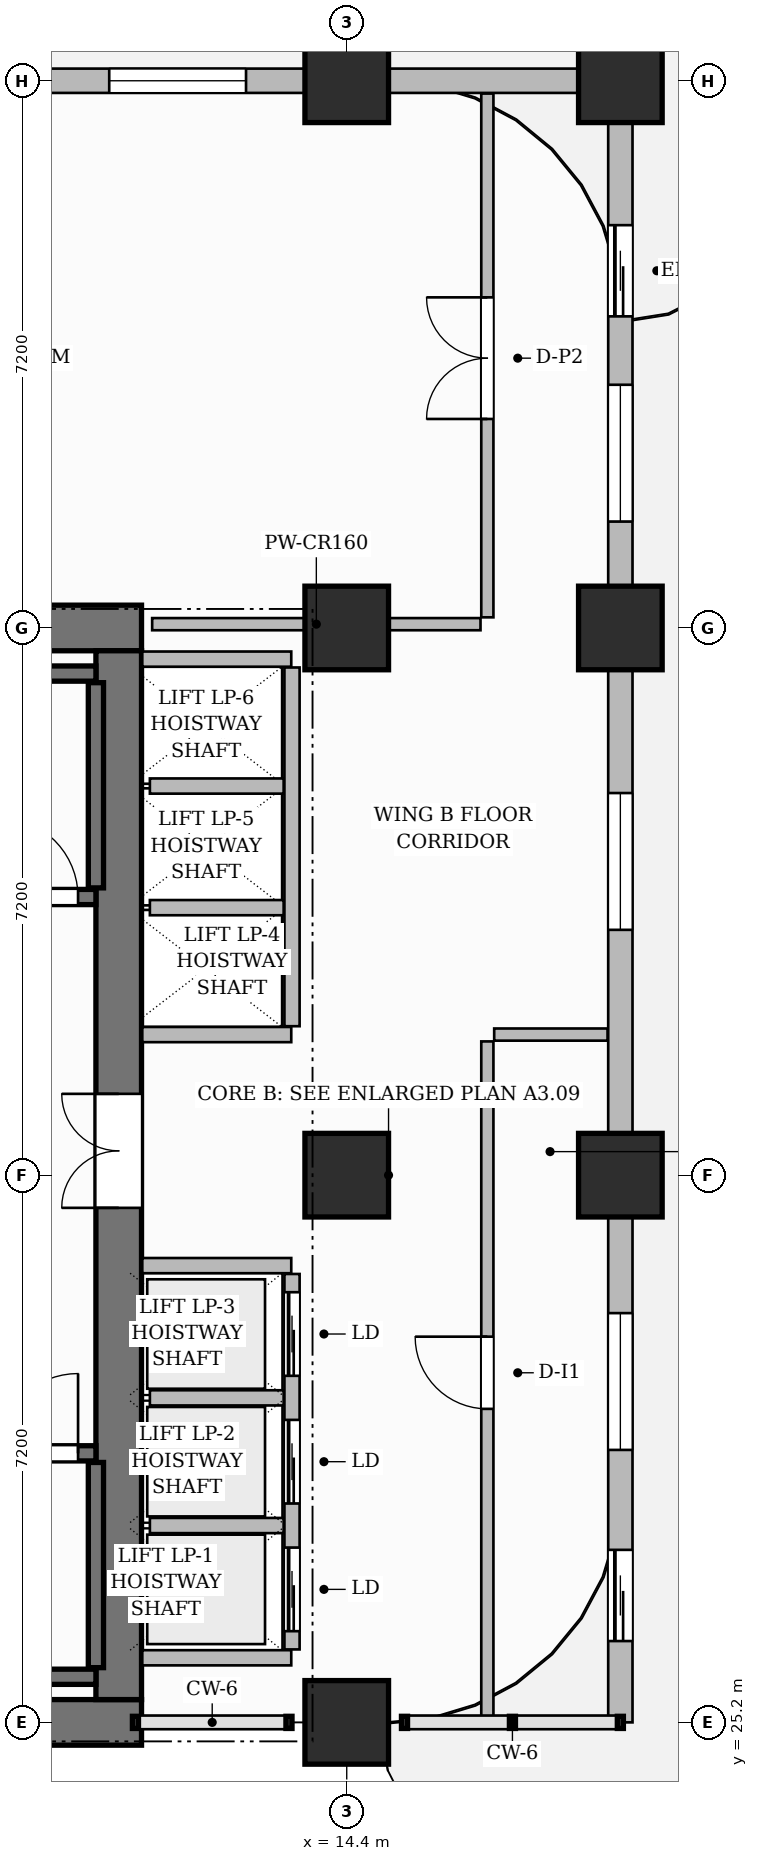
"""IFC4 building model, lengths in metres.
Left out: names, types, materials, properties, quantities, classifications, styles, units other than length and angle.
Written with IfcOpenShell. Run it as: python <this file> out.ifc"""

import sys

from ifc_helpers import new_model, si_unit, direction, frame, frame_2d, origin, origin_2d, place, context, subcontext, project, spatial, rectangle, extrude, source, transform, mapped, element, fill, save


model = new_model("IFC4")
c1 = context("Model", 3, precision=1e-05, world=origin(), true_north=direction((0.0, 1.0)))
c2 = subcontext(c1, "Body", "Model", "MODEL_VIEW")
j1 = project(units=[si_unit("LENGTHUNIT", "METRE"), si_unit("PLANEANGLEUNIT", "RADIAN")], contexts=[c1])
p1 = place(None, origin())
s1 = spatial("IfcSite", under=j1, at=p1, CompositionType="ELEMENT")
p2 = place(p1, origin())
s2 = spatial("IfcBuilding", under=s1, at=p2, CompositionType="ELEMENT")
p3 = place(p2, frame((0.0, 0.0, 62.0)))
s3 = spatial("IfcBuildingStorey", under=s2, at=p3, CompositionType="ELEMENT", Elevation=62.0)
for number, where, z_axis, x_axis in (
    (1, (3.3, 25.2, 0.0), (0.0, 0.0, 1.0), (1.0, 0.0, 0.0)),
    (2, (3.3, 39.6, 0.0), (0.0, 0.0, 1.0), (1.0, 0.0, 0.0)),
):
    element("IfcWall", number, at=place(p3, frame(where, z_axis=z_axis, x_axis=x_axis)), inside=s3, PredefinedType="SHEAR", context=c2, shape_type="SweptSolid", body=[
        extrude(rectangle(XDim=8.4, YDim=0.6, at=frame_2d((4.2, 0.0))), origin(), (0.0, 0.0, 1.0), 3.7),
    ])
p4 = place(p3, frame((11.4, 25.5, 0.0), z_axis=(0.0, 0.0, 1.0), x_axis=(0.0, 1.0, 0.0)))
e3 = element("IfcWall", 3, at=p4, inside=s3, PredefinedType="SHEAR", context=c2, shape_type="SweptSolid", body=[
    extrude(rectangle(XDim=13.8, YDim=0.6, at=frame_2d((6.9, 0.0))), origin(), (0.0, 0.0, 1.0), 3.7),
])
p5 = place(p4, frame((6.47, 0.0, 0.0)))
e4 = element("IfcOpeningElement", 4, at=p5, cuts=e3, PredefinedType="OPENING", context=c2, shape_type="SweptSolid", body=[
    extrude(rectangle(XDim=1.5, YDim=2.2, at=frame_2d((0.75, 1.1))), frame((0.0, 0.31, 0.0), z_axis=(0.0, -1.0, 0.0), x_axis=(1.0, 0.0, 0.0)), (0.0, 0.0, 1.0), 0.62),
])
m1 = source(origin(), c2, "Body", "SweptSolid", [
    extrude(rectangle(XDim=1.1, YDim=1.1, at=origin_2d()), origin(), (0.0, 0.0, 1.0), 3.7),
])
for number, where, z_axis, x_axis in (
    (5, (14.4, 25.2, 0.0), (0.0, 0.0, 1.0), (1.0, 0.0, 0.0)),
    (6, (14.4, 32.4, 0.0), (0.0, 0.0, 1.0), (1.0, 0.0, 0.0)),
    (7, (14.4, 39.6, 0.0), (0.0, 0.0, 1.0), (1.0, 0.0, 0.0)),
    (8, (14.4, 46.8, 0.0), (0.0, 0.0, 1.0), (1.0, 0.0, 0.0)),
    (9, (18.0, 32.4, 0.0), (0.0, 0.0, 1.0), (1.0, 0.0, 0.0)),
    (10, (18.0, 39.6, 0.0), (0.0, 0.0, 1.0), (1.0, 0.0, 0.0)),
    (11, (18.0, 46.8, 0.0), (0.0, 0.0, 1.0), (1.0, 0.0, 0.0)),
):
    element("IfcColumn", number, at=place(p3, frame(where, z_axis=z_axis, x_axis=x_axis)), inside=s3, PredefinedType="COLUMN", context=c2, shape_type="MappedRepresentation", body=[
        mapped(m1, transform((0.0, 0.0, 0.0), scale=1.0)),
    ])
p6 = place(p3, frame((4.0, 25.8, 0.0), z_axis=(0.0, 0.0, 1.0), x_axis=(1.0, 0.0, 0.0)))
e12 = element("IfcWall", 12, at=p6, inside=s3, PredefinedType="SHEAR", context=c2, shape_type="SweptSolid", body=[
    extrude(rectangle(XDim=7.1, YDim=0.2, at=frame_2d((3.55, 0.0))), origin(), (0.0, 0.0, 1.0), 3.7),
])
p7 = place(p3, frame((11.1, 25.92, 0.0), z_axis=(0.0, 0.0, 1.0), x_axis=(0.0, 1.0, 0.0)))
e13 = element("IfcWall", 13, at=p7, inside=s3, PredefinedType="SHEAR", context=c2, shape_type="SweptSolid", body=[
    extrude(rectangle(XDim=2.7, YDim=0.2, at=frame_2d((1.35, 0.0))), origin(), (0.0, 0.0, 1.0), 3.7),
])
p8 = place(p3, frame((4.0, 28.74, 0.0), z_axis=(0.0, 0.0, 1.0), x_axis=(1.0, 0.0, 0.0)))
e14 = element("IfcWall", 14, at=p8, inside=s3, PredefinedType="SHEAR", context=c2, shape_type="SweptSolid", body=[
    extrude(rectangle(XDim=7.1, YDim=0.2, at=frame_2d((3.55, 0.0))), origin(), (0.0, 0.0, 1.0), 3.7),
])
p9 = place(p8, frame((5.815, 0.0, 0.0)))
e15 = element("IfcOpeningElement", 15, at=p9, cuts=e14, PredefinedType="OPENING", context=c2, shape_type="SweptSolid", body=[
    extrude(rectangle(XDim=1.05, YDim=2.2, at=frame_2d((0.525, 1.1))), frame((0.0, 0.11, 0.0), z_axis=(0.0, -1.0, 0.0), x_axis=(1.0, 0.0, 0.0)), (0.0, 0.0, 1.0), 0.22),
])
p10 = place(p3, frame((4.0, 39.0, 0.0), z_axis=(0.0, 0.0, 1.0), x_axis=(1.0, 0.0, 0.0)))
e16 = element("IfcWall", 16, at=p10, inside=s3, PredefinedType="SHEAR", context=c2, shape_type="SweptSolid", body=[
    extrude(rectangle(XDim=7.1, YDim=0.2, at=frame_2d((3.55, 0.0))), origin(), (0.0, 0.0, 1.0), 3.7),
])
p11 = place(p3, frame((11.1, 36.18, 0.0), z_axis=(0.0, 0.0, 1.0), x_axis=(0.0, 1.0, 0.0)))
e17 = element("IfcWall", 17, at=p11, inside=s3, PredefinedType="SHEAR", context=c2, shape_type="SweptSolid", body=[
    extrude(rectangle(XDim=2.7, YDim=0.2, at=frame_2d((1.35, 0.0))), origin(), (0.0, 0.0, 1.0), 3.7),
])
p12 = place(p3, frame((4.0, 36.06, 0.0), z_axis=(0.0, 0.0, 1.0), x_axis=(1.0, 0.0, 0.0)))
e18 = element("IfcWall", 18, at=p12, inside=s3, PredefinedType="SHEAR", context=c2, shape_type="SweptSolid", body=[
    extrude(rectangle(XDim=7.1, YDim=0.2, at=frame_2d((3.55, 0.0))), origin(), (0.0, 0.0, 1.0), 3.7),
])
p13 = place(p12, frame((5.815, 0.0, 0.0)))
e19 = element("IfcOpeningElement", 19, at=p13, cuts=e18, PredefinedType="OPENING", context=c2, shape_type="SweptSolid", body=[
    extrude(rectangle(XDim=1.05, YDim=2.2, at=frame_2d((0.525, 1.1))), frame((0.0, 0.11, 0.0), z_axis=(0.0, -1.0, 0.0), x_axis=(1.0, 0.0, 0.0)), (0.0, 0.0, 1.0), 0.22),
])
for number, where, z_axis, x_axis in (
    (20, (11.71, 26.05, 0.0), (0.0, 0.0, 1.0), (1.0, 0.0, 0.0)),
    (21, (11.71, 31.21, 0.0), (0.0, 0.0, 1.0), (1.0, 0.0, 0.0)),
):
    element("IfcWall", number, at=place(p3, frame(where, z_axis=z_axis, x_axis=x_axis)), inside=s3, PredefinedType="PARTITIONING", context=c2, shape_type="SweptSolid", body=[
        extrude(rectangle(XDim=1.96, YDim=0.2, at=frame_2d((0.98, 0.0))), origin(), (0.0, 0.0, 1.0), 3.45),
    ])
p14 = place(p3, frame((13.68, 26.16, 0.0), z_axis=(0.0, 0.0, 1.0), x_axis=(0.0, 1.0, 0.0)))
e22 = element("IfcWall", 22, at=p14, inside=s3, PredefinedType="PARTITIONING", context=c2, shape_type="SweptSolid", body=[
    extrude(rectangle(XDim=4.94, YDim=0.2, at=frame_2d((2.47, 0.0))), origin(), (0.0, 0.0, 1.0), 3.45),
])
p15 = place(p14, frame((0.24, 0.0, 0.0)))
e23 = element("IfcOpeningElement", 23, at=p15, cuts=e22, PredefinedType="OPENING", context=c2, shape_type="SweptSolid", body=[
    extrude(rectangle(XDim=1.1, YDim=2.2, at=frame_2d((0.55, 1.1))), frame((0.0, 0.11, 0.0), z_axis=(0.0, -1.0, 0.0), x_axis=(1.0, 0.0, 0.0)), (0.0, 0.0, 1.0), 0.22),
])
p16 = place(p14, frame((1.92, 0.0, 0.0)))
e24 = element("IfcOpeningElement", 24, at=p16, cuts=e22, PredefinedType="OPENING", context=c2, shape_type="SweptSolid", body=[
    extrude(rectangle(XDim=1.1, YDim=2.2, at=frame_2d((0.55, 1.1))), frame((0.0, 0.11, 0.0), z_axis=(0.0, -1.0, 0.0), x_axis=(1.0, 0.0, 0.0)), (0.0, 0.0, 1.0), 0.22),
])
p17 = place(p14, frame((3.6, 0.0, 0.0)))
e25 = element("IfcOpeningElement", 25, at=p17, cuts=e22, PredefinedType="OPENING", context=c2, shape_type="SweptSolid", body=[
    extrude(rectangle(XDim=1.1, YDim=2.2, at=frame_2d((0.55, 1.1))), frame((0.0, 0.11, 0.0), z_axis=(0.0, -1.0, 0.0), x_axis=(1.0, 0.0, 0.0)), (0.0, 0.0, 1.0), 0.22),
])
for number, where, z_axis, x_axis in (
    (26, (11.81, 27.79, 0.0), (0.0, 0.0, 1.0), (1.0, 0.0, 0.0)),
    (27, (11.81, 29.47, 0.0), (0.0, 0.0, 1.0), (1.0, 0.0, 0.0)),
):
    element("IfcWall", number, at=place(p3, frame(where, z_axis=z_axis, x_axis=x_axis)), inside=s3, PredefinedType="PARTITIONING", context=c2, shape_type="SweptSolid", body=[
        extrude(rectangle(XDim=1.76, YDim=0.2, at=frame_2d((0.88, 0.0))), origin(), (0.0, 0.0, 1.0), 3.45),
    ])
for number, where, z_axis, x_axis in (
    (28, (11.71, 34.25, 0.0), (0.0, 0.0, 1.0), (1.0, 0.0, 0.0)),
    (29, (11.71, 39.19, 0.0), (0.0, 0.0, 1.0), (1.0, 0.0, 0.0)),
):
    element("IfcWall", number, at=place(p3, frame(where, z_axis=z_axis, x_axis=x_axis)), inside=s3, PredefinedType="PARTITIONING", context=c2, shape_type="SweptSolid", body=[
        extrude(rectangle(XDim=1.96, YDim=0.2, at=frame_2d((0.98, 0.0))), origin(), (0.0, 0.0, 1.0), 3.45),
    ])
p18 = place(p3, frame((13.68, 34.36, 0.0), z_axis=(0.0, 0.0, 1.0), x_axis=(0.0, 1.0, 0.0)))
e30 = element("IfcWall", 30, at=p18, inside=s3, PredefinedType="PARTITIONING", context=c2, shape_type="SweptSolid", body=[
    extrude(rectangle(XDim=4.72, YDim=0.2, at=frame_2d((2.36, 0.0))), origin(), (0.0, 0.0, 1.0), 3.45),
])
for number, where, z_axis, x_axis in (
    (31, (11.81, 35.92, 0.0), (0.0, 0.0, 1.0), (1.0, 0.0, 0.0)),
    (32, (11.81, 37.52, 0.0), (0.0, 0.0, 1.0), (1.0, 0.0, 0.0)),
):
    element("IfcWall", number, at=place(p3, frame(where, z_axis=z_axis, x_axis=x_axis)), inside=s3, PredefinedType="PARTITIONING", context=c2, shape_type="SweptSolid", body=[
        extrude(rectangle(XDim=1.76, YDim=0.2, at=frame_2d((0.88, 0.0))), origin(), (0.0, 0.0, 1.0), 3.45),
    ])
p19 = place(p3, frame((16.25, 25.228, 0.0), z_axis=(0.0, 0.0, 1.0), x_axis=(0.0, 1.0, 0.0)))
e33 = element("IfcWall", 33, at=p19, inside=s3, PredefinedType="PARTITIONING", context=c2, shape_type="SweptSolid", body=[
    extrude(rectangle(XDim=8.932, YDim=0.16, at=frame_2d((4.466, 0.0))), origin(), (0.0, 0.0, 1.0), 3.45),
])
p20 = place(p19, frame((4.097, 0.0, 0.0)))
e34 = element("IfcOpeningElement", 34, at=p20, cuts=e33, PredefinedType="OPENING", context=c2, shape_type="SweptSolid", body=[
    extrude(rectangle(XDim=0.95, YDim=2.15, at=frame_2d((0.475, 1.075))), frame((0.0, 0.09, 0.0), z_axis=(0.0, -1.0, 0.0), x_axis=(1.0, 0.0, 0.0)), (0.0, 0.0, 1.0), 0.18),
])
p21 = place(p3, frame((16.34, 34.25, 0.0), z_axis=(0.0, 0.0, 1.0), x_axis=(1.0, 0.0, 0.0)))
e35 = element("IfcWall", 35, at=p21, inside=s3, PredefinedType="PARTITIONING", context=c2, shape_type="SweptSolid", body=[
    extrude(rectangle(XDim=1.492, YDim=0.16, at=frame_2d((0.746, 0.0))), origin(), (0.0, 0.0, 1.0), 3.45),
])
p22 = place(p3, frame((16.25, 39.74, 0.0), z_axis=(0.0, 0.0, 1.0), x_axis=(0.0, 1.0, 0.0)))
e36 = element("IfcWall", 36, at=p22, inside=s3, PredefinedType="PARTITIONING", context=c2, shape_type="SweptSolid", body=[
    extrude(rectangle(XDim=6.892, YDim=0.16, at=frame_2d((3.446, 0.0))), origin(), (0.0, 0.0, 1.0), 3.45),
])
p23 = place(p22, frame((2.61, 0.0, 0.0)))
e37 = element("IfcOpeningElement", 37, at=p23, cuts=e36, PredefinedType="OPENING", context=c2, shape_type="SweptSolid", body=[
    extrude(rectangle(XDim=1.6, YDim=2.4, at=frame_2d((0.8, 1.2))), frame((0.0, 0.09, 0.0), z_axis=(0.0, -1.0, 0.0), x_axis=(1.0, 0.0, 0.0)), (0.0, 0.0, 1.0), 0.18),
])
p24 = place(p3, frame((11.84, 39.65, 0.0), z_axis=(0.0, 0.0, 1.0), x_axis=(1.0, 0.0, 0.0)))
e38 = element("IfcWall", 38, at=p24, inside=s3, PredefinedType="PARTITIONING", context=c2, shape_type="SweptSolid", body=[
    extrude(rectangle(XDim=4.32, YDim=0.16, at=frame_2d((2.16, 0.0))), origin(), (0.0, 0.0, 1.0), 2.885),
])
p25 = place(p3, frame((18.0, 25.2, 0.0), z_axis=(0.0, 0.0, 1.0), x_axis=(0.0, 1.0, 0.0)))
e39 = element("IfcWall", 39, at=p25, inside=s3, PredefinedType="SOLIDWALL", context=c2, shape_type="SweptSolid", body=[
    extrude(rectangle(XDim=21.55, YDim=0.32, at=frame_2d((10.775, 0.0))), origin(), (0.0, 0.0, 1.0), 3.45),
])
p26 = place(p25, frame((18.5, 0.0, 0.0)))
e40 = element("IfcOpeningElement", 40, at=p26, cuts=e39, PredefinedType="OPENING", context=c2, shape_type="SweptSolid", body=[
    extrude(rectangle(XDim=1.2, YDim=2.2, at=frame_2d((0.6, 1.1))), frame((0.0, 0.17, 0.0), z_axis=(0.0, -1.0, 0.0), x_axis=(1.0, 0.0, 0.0)), (0.0, 0.0, 1.0), 0.34),
])
p27 = place(p25, frame((1.07, 0.0, 0.0)))
e41 = element("IfcOpeningElement", 41, at=p27, cuts=e39, PredefinedType="OPENING", context=c2, shape_type="SweptSolid", body=[
    extrude(rectangle(XDim=1.2, YDim=2.2, at=frame_2d((0.6, 1.1))), frame((0.0, 0.17, 0.0), z_axis=(0.0, -1.0, 0.0), x_axis=(1.0, 0.0, 0.0)), (0.0, 0.0, 1.0), 0.34),
])
p28 = place(p25, frame((3.585, 0.0, 0.8)))
e42 = element("IfcOpeningElement", 42, at=p28, cuts=e39, PredefinedType="OPENING", context=c2, shape_type="SweptSolid", body=[
    extrude(rectangle(XDim=1.8, YDim=1.85, at=frame_2d((0.9, 0.925))), frame((0.0, 0.17, 0.0), z_axis=(0.0, -1.0, 0.0), x_axis=(1.0, 0.0, 0.0)), (0.0, 0.0, 1.0), 0.34),
])
p29 = place(p25, frame((10.428, 0.0, 0.8)))
e43 = element("IfcOpeningElement", 43, at=p29, cuts=e39, PredefinedType="OPENING", context=c2, shape_type="SweptSolid", body=[
    extrude(rectangle(XDim=1.8, YDim=1.85, at=frame_2d((0.9, 0.925))), frame((0.0, 0.17, 0.0), z_axis=(0.0, -1.0, 0.0), x_axis=(1.0, 0.0, 0.0)), (0.0, 0.0, 1.0), 0.34),
])
p30 = place(p25, frame((15.8, 0.0, 0.8)))
e44 = element("IfcOpeningElement", 44, at=p30, cuts=e39, PredefinedType="OPENING", context=c2, shape_type="SweptSolid", body=[
    extrude(rectangle(XDim=1.8, YDim=1.85, at=frame_2d((0.9, 0.925))), frame((0.0, 0.17, 0.0), z_axis=(0.0, -1.0, 0.0), x_axis=(1.0, 0.0, 0.0)), (0.0, 0.0, 1.0), 0.34),
])
p31 = place(p3, frame((0.0, 46.8, 0.0), z_axis=(0.0, 0.0, 1.0), x_axis=(1.0, 0.0, 0.0)))
e45 = element("IfcWall", 45, at=p31, inside=s3, PredefinedType="SOLIDWALL", context=c2, shape_type="SweptSolid", body=[
    extrude(rectangle(XDim=18.0, YDim=0.32, at=frame_2d((9.0, 0.0))), origin(), (0.0, 0.0, 1.0), 2.885),
])
p32 = place(p31, frame((1.325, 0.0, 0.8)))
e46 = element("IfcOpeningElement", 46, at=p32, cuts=e45, PredefinedType="OPENING", context=c2, shape_type="SweptSolid", body=[
    extrude(rectangle(XDim=1.8, YDim=1.85, at=frame_2d((0.9, 0.925))), frame((0.0, 0.17, 0.0), z_axis=(0.0, -1.0, 0.0), x_axis=(1.0, 0.0, 0.0)), (0.0, 0.0, 1.0), 0.34),
])
p33 = place(p31, frame((4.075, 0.0, 0.8)))
e47 = element("IfcOpeningElement", 47, at=p33, cuts=e45, PredefinedType="OPENING", context=c2, shape_type="SweptSolid", body=[
    extrude(rectangle(XDim=1.8, YDim=1.85, at=frame_2d((0.9, 0.925))), frame((0.0, 0.17, 0.0), z_axis=(0.0, -1.0, 0.0), x_axis=(1.0, 0.0, 0.0)), (0.0, 0.0, 1.0), 0.34),
])
p34 = place(p31, frame((8.525, 0.0, 0.8)))
e48 = element("IfcOpeningElement", 48, at=p34, cuts=e45, PredefinedType="OPENING", context=c2, shape_type="SweptSolid", body=[
    extrude(rectangle(XDim=1.8, YDim=1.85, at=frame_2d((0.9, 0.925))), frame((0.0, 0.17, 0.0), z_axis=(0.0, -1.0, 0.0), x_axis=(1.0, 0.0, 0.0)), (0.0, 0.0, 1.0), 0.34),
])
p35 = place(p31, frame((11.275, 0.0, 0.8)))
e49 = element("IfcOpeningElement", 49, at=p35, cuts=e45, PredefinedType="OPENING", context=c2, shape_type="SweptSolid", body=[
    extrude(rectangle(XDim=1.8, YDim=1.85, at=frame_2d((0.9, 0.925))), frame((0.0, 0.17, 0.0), z_axis=(0.0, -1.0, 0.0), x_axis=(1.0, 0.0, 0.0)), (0.0, 0.0, 1.0), 0.34),
])
m2 = source(origin(), c2, "Body", "SweptSolid", [
    extrude(rectangle(XDim=1.05, YDim=2.2, at=frame_2d((0.525, 1.1))), frame((0.0, 0.025, 0.0), z_axis=(0.0, -1.0, 0.0), x_axis=(1.0, 0.0, 0.0)), (0.0, 0.0, 1.0), 0.05),
])
p36 = place(p9, origin())
e50 = element("IfcDoor", 50, at=p36, inside=s3, OperationType="SINGLE_SWING_RIGHT", PredefinedType="DOOR", context=c2, shape_type="MappedRepresentation", body=[
    mapped(m2, transform((0.0, 0.0, 0.0), scale=1.0)),
])
fill(e15, e50)
p37 = place(p13, origin())
e51 = element("IfcDoor", 51, at=p37, inside=s3, OperationType="SINGLE_SWING_LEFT", PredefinedType="DOOR", context=c2, shape_type="MappedRepresentation", body=[
    mapped(m2, transform((0.0, 0.0, 0.0), scale=1.0)),
])
fill(e19, e51)
m3 = source(origin(), c2, "Body", "SweptSolid", [
    extrude(rectangle(XDim=1.5, YDim=2.2, at=frame_2d((0.75, 1.1))), frame((0.0, 0.025, 0.0), z_axis=(0.0, -1.0, 0.0), x_axis=(1.0, 0.0, 0.0)), (0.0, 0.0, 1.0), 0.05),
])
p38 = place(p5, origin())
e52 = element("IfcDoor", 52, at=p38, inside=s3, OperationType="DOUBLE_DOOR_SINGLE_SWING", PredefinedType="DOOR", context=c2, shape_type="MappedRepresentation", body=[
    mapped(m3, transform((0.0, 0.0, 0.0), scale=1.0)),
])
fill(e4, e52)
m4 = source(origin(), c2, "Body", "SweptSolid", [
    extrude(rectangle(XDim=0.95, YDim=2.15, at=frame_2d((0.475, 1.075))), frame((0.0, 0.025, 0.0), z_axis=(0.0, -1.0, 0.0), x_axis=(1.0, 0.0, 0.0)), (0.0, 0.0, 1.0), 0.05),
])
p39 = place(p20, origin())
e53 = element("IfcDoor", 53, at=p39, inside=s3, OperationType="SINGLE_SWING_RIGHT", PredefinedType="DOOR", context=c2, shape_type="MappedRepresentation", body=[
    mapped(m4, transform((0.0, 0.0, 0.0), scale=1.0)),
])
fill(e34, e53)
m5 = source(origin(), c2, "Body", "SweptSolid", [
    extrude(rectangle(XDim=1.6, YDim=2.4, at=frame_2d((0.8, 1.2))), frame((0.0, 0.025, 0.0), z_axis=(0.0, -1.0, 0.0), x_axis=(1.0, 0.0, 0.0)), (0.0, 0.0, 1.0), 0.05),
])
p40 = place(p23, origin())
e54 = element("IfcDoor", 54, at=p40, inside=s3, OperationType="DOUBLE_DOOR_SINGLE_SWING", PredefinedType="DOOR", context=c2, shape_type="MappedRepresentation", body=[
    mapped(m5, transform((0.0, 0.0, 0.0), scale=1.0)),
])
fill(e37, e54)
m6 = source(origin(), c2, "Body", "SweptSolid", [
    extrude(rectangle(XDim=1.1, YDim=2.2, at=frame_2d((0.55, 1.1))), frame((0.0, 0.025, 0.0), z_axis=(0.0, -1.0, 0.0), x_axis=(1.0, 0.0, 0.0)), (0.0, 0.0, 1.0), 0.05),
])
p41 = place(p15, origin())
e55 = element("IfcDoor", 55, at=p41, inside=s3, OperationType="SLIDING_TO_LEFT", PredefinedType="DOOR", context=c2, shape_type="MappedRepresentation", body=[
    mapped(m6, transform((0.0, 0.0, 0.0), scale=1.0)),
])
fill(e23, e55)
p42 = place(p16, origin())
e56 = element("IfcDoor", 56, at=p42, inside=s3, OperationType="SLIDING_TO_LEFT", PredefinedType="DOOR", context=c2, shape_type="MappedRepresentation", body=[
    mapped(m6, transform((0.0, 0.0, 0.0), scale=1.0)),
])
fill(e24, e56)
p43 = place(p17, origin())
e57 = element("IfcDoor", 57, at=p43, inside=s3, OperationType="SLIDING_TO_LEFT", PredefinedType="DOOR", context=c2, shape_type="MappedRepresentation", body=[
    mapped(m6, transform((0.0, 0.0, 0.0), scale=1.0)),
])
fill(e25, e57)
m7 = source(origin(), c2, "Body", "SweptSolid", [
    extrude(rectangle(XDim=1.2, YDim=2.2, at=frame_2d((0.6, 1.1))), frame((0.0, 0.025, 0.0), z_axis=(0.0, -1.0, 0.0), x_axis=(1.0, 0.0, 0.0)), (0.0, 0.0, 1.0), 0.05),
])
p44 = place(p26, origin())
e58 = element("IfcDoor", 58, at=p44, inside=s3, OperationType="SLIDING_TO_LEFT", PredefinedType="DOOR", context=c2, shape_type="MappedRepresentation", body=[
    mapped(m7, transform((0.0, 0.0, 0.0), scale=1.0)),
])
fill(e40, e58)
p45 = place(p27, origin())
e59 = element("IfcDoor", 59, at=p45, inside=s3, OperationType="SLIDING_TO_LEFT", PredefinedType="DOOR", context=c2, shape_type="MappedRepresentation", body=[
    mapped(m7, transform((0.0, 0.0, 0.0), scale=1.0)),
])
fill(e41, e59)
m8 = source(origin(), c2, "Body", "SweptSolid", [
    extrude(rectangle(XDim=1.8, YDim=1.85, at=frame_2d((0.9, 0.925))), frame((0.0, 0.03, 0.0), z_axis=(0.0, -1.0, 0.0), x_axis=(1.0, 0.0, 0.0)), (0.0, 0.0, 1.0), 0.06),
])
p46 = place(p28, origin())
e60 = element("IfcWindow", 60, at=p46, inside=s3, PartitioningType="DOUBLE_PANEL_VERTICAL", PredefinedType="WINDOW", context=c2, shape_type="MappedRepresentation", body=[
    mapped(m8, transform((0.0, 0.0, 0.0), scale=1.0)),
])
fill(e42, e60)
p47 = place(p29, origin())
e61 = element("IfcWindow", 61, at=p47, inside=s3, PartitioningType="DOUBLE_PANEL_VERTICAL", PredefinedType="WINDOW", context=c2, shape_type="MappedRepresentation", body=[
    mapped(m8, transform((0.0, 0.0, 0.0), scale=1.0)),
])
fill(e43, e61)
p48 = place(p30, origin())
e62 = element("IfcWindow", 62, at=p48, inside=s3, PartitioningType="DOUBLE_PANEL_VERTICAL", PredefinedType="WINDOW", context=c2, shape_type="MappedRepresentation", body=[
    mapped(m8, transform((0.0, 0.0, 0.0), scale=1.0)),
])
fill(e44, e62)
p49 = place(p35, origin())
e63 = element("IfcWindow", 63, at=p49, inside=s3, PartitioningType="DOUBLE_PANEL_VERTICAL", PredefinedType="WINDOW", context=c2, shape_type="MappedRepresentation", body=[
    mapped(m8, transform((0.0, 0.0, 0.0), scale=1.0)),
])
fill(e49, e63)
save(model, sys.argv[1])
